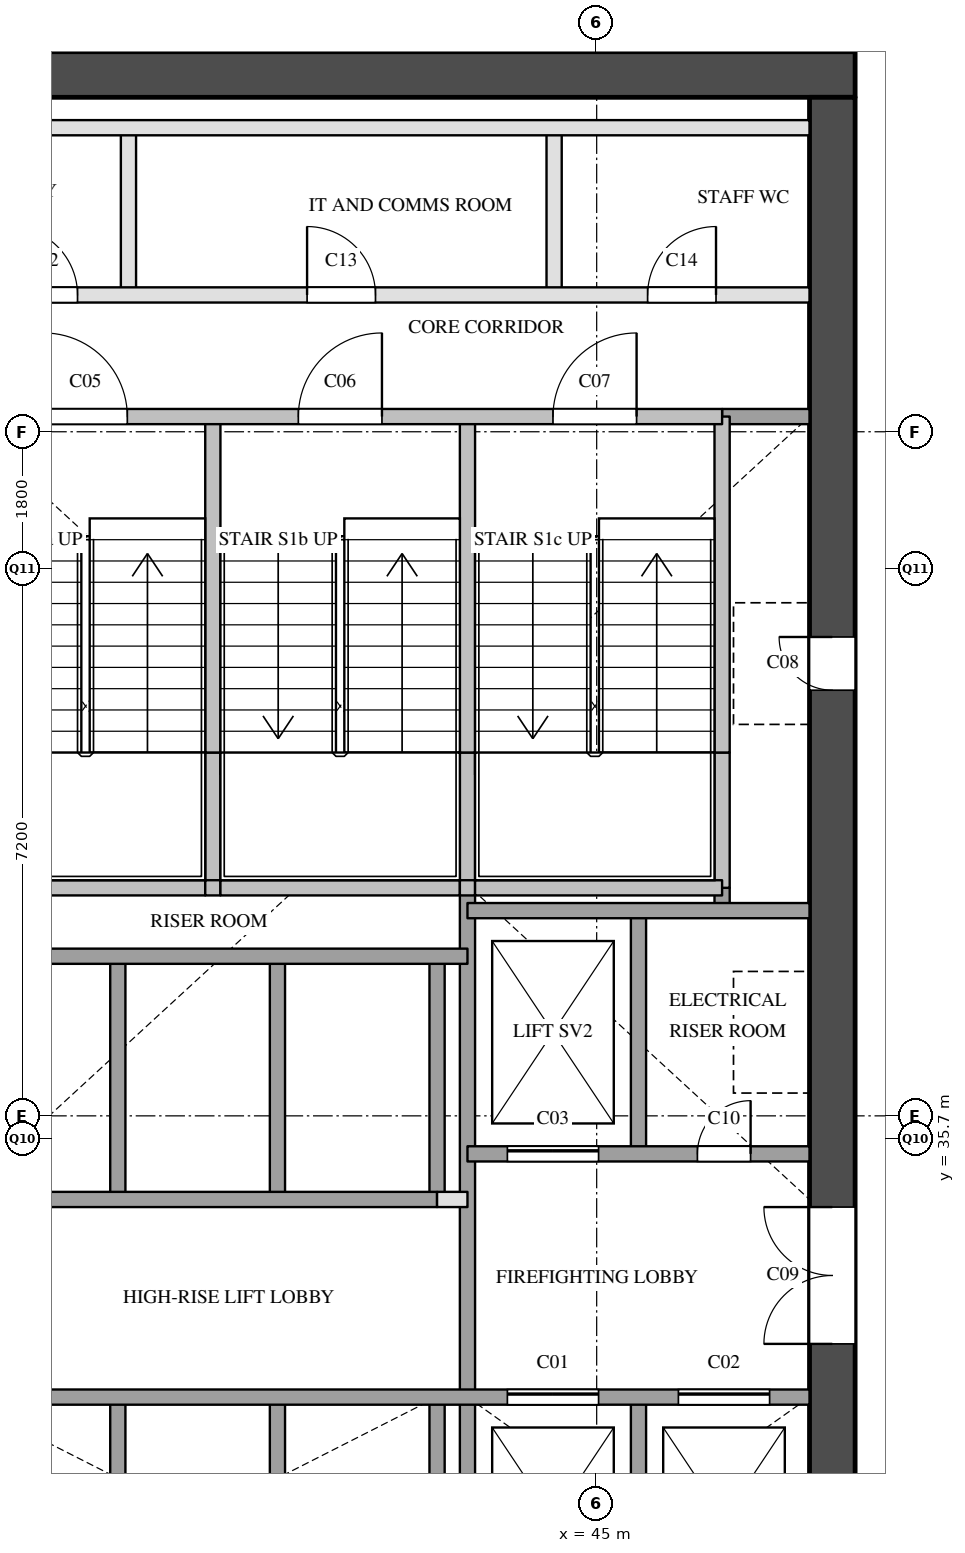
"""IFC4 building model, lengths in metres.
Left out: names, types, materials, properties, quantities, classifications, styles, units other than length and angle.
Written with IfcOpenShell. Run it as: python <this file> out.ifc"""

import sys

from ifc_helpers import new_model, si_unit, direction, frame, frame_2d, origin, place, context, subcontext, project, spatial, rectangle, extrude, element, fill, save


model = new_model("IFC4")
c1 = context("Model", 3, precision=1e-05, world=origin(), true_north=direction((0.0, 1.0)))
c2 = subcontext(c1, "Body", "Model", "MODEL_VIEW")
j1 = project(units=[si_unit("LENGTHUNIT", "METRE"), si_unit("PLANEANGLEUNIT", "RADIAN")], contexts=[c1])
p1 = place(None, origin())
s1 = spatial("IfcSite", under=j1, at=p1, CompositionType="ELEMENT")
p2 = place(p1, origin())
s2 = spatial("IfcBuilding", under=s1, at=p2, CompositionType="ELEMENT")
p3 = place(p2, frame((0.0, 0.0, 85.4)))
s3 = spatial("IfcBuildingStorey", under=s2, at=p3, CompositionType="ELEMENT", Elevation=85.4)
p4 = place(p3, frame((36.0, 49.7, 0.0), z_axis=(0.0, 0.0, 1.0), x_axis=(1.0, 0.0, 0.0)))
e1 = element("IfcWall", 1, at=p4, inside=s3, PredefinedType="SHEAR", context=c2, shape_type="SweptSolid", body=[
    extrude(rectangle(XDim=12.4, YDim=0.6, at=frame_2d((6.2, 0.0))), origin(), (0.0, 0.0, 1.0), 3.5),
])
p5 = place(p3, frame((48.1, 29.1, 0.0), z_axis=(0.0, 0.0, 1.0), x_axis=(0.0, 1.0, 0.0)))
e2 = element("IfcWall", 2, at=p5, inside=s3, PredefinedType="SHEAR", context=c2, shape_type="SweptSolid", body=[
    extrude(rectangle(XDim=20.3, YDim=0.6, at=frame_2d((10.15, 0.0))), origin(), (0.0, 0.0, 1.0), 3.5),
])
p6 = place(p5, frame((12.5, 0.0, 0.0)))
e3 = element("IfcOpeningElement", 3, at=p6, cuts=e2, PredefinedType="OPENING", context=c2, shape_type="SweptSolid", body=[
    extrude(rectangle(XDim=0.7, YDim=2.1, at=frame_2d((0.35, 1.05))), frame((0.0, 0.31, 0.0), z_axis=(0.0, -1.0, 0.0), x_axis=(1.0, 0.0, 0.0)), (0.0, 0.0, 1.0), 0.62),
])
p7 = place(p5, frame((3.9, 0.0, 0.0)))
e4 = element("IfcOpeningElement", 4, at=p7, cuts=e2, PredefinedType="OPENING", context=c2, shape_type="SweptSolid", body=[
    extrude(rectangle(XDim=1.8, YDim=2.1, at=frame_2d((0.9, 1.05))), frame((0.0, 0.31, 0.0), z_axis=(0.0, -1.0, 0.0), x_axis=(1.0, 0.0, 0.0)), (0.0, 0.0, 1.0), 0.62),
])
p8 = place(p3, frame((38.7, 29.1, 0.0), z_axis=(0.0, 0.0, 1.0), x_axis=(0.0, 1.0, 0.0)))
e5 = element("IfcWall", 5, at=p8, inside=s3, PredefinedType="SOLIDWALL", context=c2, shape_type="SweptSolid", body=[
    extrude(rectangle(XDim=3.2, YDim=0.2, at=frame_2d((1.6, 0.0))), origin(), (0.0, 0.0, 1.0), 3.5),
])
p9 = place(p3, frame((38.7, 34.9, 0.0), z_axis=(0.0, 0.0, 1.0), x_axis=(0.0, 1.0, 0.0)))
e6 = element("IfcWall", 6, at=p9, inside=s3, PredefinedType="SOLIDWALL", context=c2, shape_type="SweptSolid", body=[
    extrude(rectangle(XDim=3.2, YDim=0.2, at=frame_2d((1.6, 0.0))), origin(), (0.0, 0.0, 1.0), 3.5),
])
p10 = place(p3, frame((38.84, 46.8, 0.0), z_axis=(0.0, 0.0, 1.0), x_axis=(0.0, 1.0, 0.0)))
e7 = element("IfcWall", 7, at=p10, inside=s3, PredefinedType="PARTITIONING", context=c2, shape_type="SweptSolid", body=[
    extrude(rectangle(XDim=2.2, YDim=0.2, at=frame_2d((1.1, 0.0))), origin(), (0.0, 0.0, 1.0), 3.5),
])
p11 = place(p3, frame((39.95, 39.0, 0.0), z_axis=(0.0, 0.0, 1.0), x_axis=(0.0, 1.0, 0.0)))
e8 = element("IfcWall", 8, at=p11, inside=s3, PredefinedType="SOLIDWALL", context=c2, shape_type="SweptSolid", body=[
    extrude(rectangle(XDim=1.78, YDim=0.2, at=frame_2d((0.89, 0.0))), origin(), (0.0, 0.0, 1.0), 3.5),
])
p12 = place(p3, frame((39.95, 40.78, 0.0), z_axis=(0.0, 0.0, 1.0), x_axis=(0.0, 1.0, 0.0)))
e9 = element("IfcWall", 9, at=p12, inside=s3, PredefinedType="SOLIDWALL", context=c2, shape_type="SweptSolid", body=[
    extrude(rectangle(XDim=4.42, YDim=0.2, at=frame_2d((2.21, 0.0))), origin(), (0.0, 0.0, 1.0), 3.5),
])
p13 = place(p3, frame((40.8, 29.1, 0.0), z_axis=(0.0, 0.0, 1.0), x_axis=(0.0, 1.0, 0.0)))
e10 = element("IfcWall", 10, at=p13, inside=s3, PredefinedType="SOLIDWALL", context=c2, shape_type="SweptSolid", body=[
    extrude(rectangle(XDim=3.2, YDim=0.2, at=frame_2d((1.6, 0.0))), origin(), (0.0, 0.0, 1.0), 3.5),
])
p14 = place(p3, frame((40.8, 34.9, 0.0), z_axis=(0.0, 0.0, 1.0), x_axis=(0.0, 1.0, 0.0)))
e11 = element("IfcWall", 11, at=p14, inside=s3, PredefinedType="SOLIDWALL", context=c2, shape_type="SweptSolid", body=[
    extrude(rectangle(XDim=3.2, YDim=0.2, at=frame_2d((1.6, 0.0))), origin(), (0.0, 0.0, 1.0), 3.5),
])
p15 = place(p3, frame((42.9, 29.1, 0.0), z_axis=(0.0, 0.0, 1.0), x_axis=(0.0, 1.0, 0.0)))
e12 = element("IfcWall", 12, at=p15, inside=s3, PredefinedType="SOLIDWALL", context=c2, shape_type="SweptSolid", body=[
    extrude(rectangle(XDim=3.2, YDim=0.2, at=frame_2d((1.6, 0.0))), origin(), (0.0, 0.0, 1.0), 3.5),
])
p16 = place(p3, frame((42.9, 34.9, 0.0), z_axis=(0.0, 0.0, 1.0), x_axis=(0.0, 1.0, 0.0)))
e13 = element("IfcWall", 13, at=p16, inside=s3, PredefinedType="SOLIDWALL", context=c2, shape_type="SweptSolid", body=[
    extrude(rectangle(XDim=3.2, YDim=0.2, at=frame_2d((1.6, 0.0))), origin(), (0.0, 0.0, 1.0), 3.5),
])
p17 = place(p3, frame((43.3, 29.1, 0.0), z_axis=(0.0, 0.0, 1.0), x_axis=(0.0, 1.0, 0.0)))
e14 = element("IfcWall", 14, at=p17, inside=s3, PredefinedType="SOLIDWALL", context=c2, shape_type="SweptSolid", body=[
    extrude(rectangle(XDim=9.9, YDim=0.2, at=frame_2d((4.95, 0.0))), origin(), (0.0, 0.0, 1.0), 3.5),
])
p18 = place(p3, frame((43.3, 39.0, 0.0), z_axis=(0.0, 0.0, 1.0), x_axis=(0.0, 1.0, 0.0)))
e15 = element("IfcWall", 15, at=p18, inside=s3, PredefinedType="SOLIDWALL", context=c2, shape_type="SweptSolid", body=[
    extrude(rectangle(XDim=1.78, YDim=0.2, at=frame_2d((0.89, 0.0))), origin(), (0.0, 0.0, 1.0), 3.5),
])
p19 = place(p3, frame((43.3, 40.78, 0.0), z_axis=(0.0, 0.0, 1.0), x_axis=(0.0, 1.0, 0.0)))
e16 = element("IfcWall", 16, at=p19, inside=s3, PredefinedType="SOLIDWALL", context=c2, shape_type="SweptSolid", body=[
    extrude(rectangle(XDim=4.42, YDim=0.2, at=frame_2d((2.21, 0.0))), origin(), (0.0, 0.0, 1.0), 3.5),
])
p20 = place(p3, frame((44.44, 46.8, 0.0), z_axis=(0.0, 0.0, 1.0), x_axis=(0.0, 1.0, 0.0)))
e17 = element("IfcWall", 17, at=p20, inside=s3, PredefinedType="PARTITIONING", context=c2, shape_type="SweptSolid", body=[
    extrude(rectangle(XDim=2.2, YDim=0.2, at=frame_2d((1.1, 0.0))), origin(), (0.0, 0.0, 1.0), 3.5),
])
for number, where, z_axis, x_axis in (
    (18, (45.55, 29.1, 0.0), (0.0, 0.0, 1.0), (0.0, 1.0, 0.0)),
    (19, (45.55, 35.5, 0.0), (0.0, 0.0, 1.0), (0.0, 1.0, 0.0)),
):
    element("IfcWall", number, at=place(p3, frame(where, z_axis=z_axis, x_axis=x_axis)), inside=s3, PredefinedType="SOLIDWALL", context=c2, shape_type="SweptSolid", body=[
        extrude(rectangle(XDim=3.2, YDim=0.2, at=frame_2d((1.6, 0.0))), origin(), (0.0, 0.0, 1.0), 3.5),
    ])
p21 = place(p3, frame((46.65, 38.7, 0.0), z_axis=(0.0, 0.0, 1.0), x_axis=(0.0, 1.0, 0.0)))
e20 = element("IfcWall", 20, at=p21, inside=s3, PredefinedType="SOLIDWALL", context=c2, shape_type="SweptSolid", body=[
    extrude(rectangle(XDim=0.3, YDim=0.2, at=frame_2d((0.15, 0.0))), origin(), (0.0, 0.0, 1.0), 3.5),
])
p22 = place(p3, frame((46.65, 39.0, 0.0), z_axis=(0.0, 0.0, 1.0), x_axis=(0.0, 1.0, 0.0)))
e21 = element("IfcWall", 21, at=p22, inside=s3, PredefinedType="SOLIDWALL", context=c2, shape_type="SweptSolid", body=[
    extrude(rectangle(XDim=1.78, YDim=0.2, at=frame_2d((0.89, 0.0))), origin(), (0.0, 0.0, 1.0), 3.5),
])
p23 = place(p3, frame((46.65, 40.78, 0.0), z_axis=(0.0, 0.0, 1.0), x_axis=(0.0, 1.0, 0.0)))
e22 = element("IfcWall", 22, at=p23, inside=s3, PredefinedType="SOLIDWALL", context=c2, shape_type="SweptSolid", body=[
    extrude(rectangle(XDim=4.42, YDim=0.2, at=frame_2d((2.21, 0.0))), origin(), (0.0, 0.0, 1.0), 3.5),
])
p24 = place(p3, frame((36.6, 32.3, 0.0), z_axis=(0.0, 0.0, 1.0), x_axis=(1.0, 0.0, 0.0)))
e23 = element("IfcWall", 23, at=p24, inside=s3, PredefinedType="SOLIDWALL", context=c2, shape_type="SweptSolid", body=[
    extrude(rectangle(XDim=11.2, YDim=0.2, at=frame_2d((5.6, 0.0))), origin(), (0.0, 0.0, 1.0), 3.5),
])
p25 = place(p24, frame((7.225, 0.0, 0.0)))
e24 = element("IfcOpeningElement", 24, at=p25, cuts=e23, PredefinedType="OPENING", context=c2, shape_type="SweptSolid", body=[
    extrude(rectangle(XDim=1.2, YDim=2.1, at=frame_2d((0.6, 1.05))), frame((0.0, 0.11, 0.0), z_axis=(0.0, -1.0, 0.0), x_axis=(1.0, 0.0, 0.0)), (0.0, 0.0, 1.0), 0.22),
])
p26 = place(p24, frame((9.475, 0.0, 0.0)))
e25 = element("IfcOpeningElement", 25, at=p26, cuts=e23, PredefinedType="OPENING", context=c2, shape_type="SweptSolid", body=[
    extrude(rectangle(XDim=1.2, YDim=2.1, at=frame_2d((0.6, 1.05))), frame((0.0, 0.11, 0.0), z_axis=(0.0, -1.0, 0.0), x_axis=(1.0, 0.0, 0.0)), (0.0, 0.0, 1.0), 0.22),
])
p27 = place(p3, frame((42.9, 34.9, 0.0), z_axis=(0.0, 0.0, 1.0), x_axis=(1.0, 0.0, 0.0)))
e26 = element("IfcWall", 26, at=p27, inside=s3, PredefinedType="PARTITIONING", context=c2, shape_type="SweptSolid", body=[
    extrude(rectangle(XDim=0.4, YDim=0.2, at=frame_2d((0.2, 0.0))), origin(), (0.0, 0.0, 1.0), 3.5),
])
p28 = place(p3, frame((36.6, 34.9, 0.0), z_axis=(0.0, 0.0, 1.0), x_axis=(1.0, 0.0, 0.0)))
e27 = element("IfcWall", 27, at=p28, inside=s3, PredefinedType="SOLIDWALL", context=c2, shape_type="SweptSolid", body=[
    extrude(rectangle(XDim=6.3, YDim=0.2, at=frame_2d((3.15, 0.0))), origin(), (0.0, 0.0, 1.0), 3.5),
])
p29 = place(p3, frame((43.3, 35.5, 0.0), z_axis=(0.0, 0.0, 1.0), x_axis=(1.0, 0.0, 0.0)))
e28 = element("IfcWall", 28, at=p29, inside=s3, PredefinedType="SOLIDWALL", context=c2, shape_type="SweptSolid", body=[
    extrude(rectangle(XDim=4.5, YDim=0.2, at=frame_2d((2.25, 0.0))), origin(), (0.0, 0.0, 1.0), 3.5),
])
p30 = place(p29, frame((0.525, 0.0, 0.0)))
e29 = element("IfcOpeningElement", 29, at=p30, cuts=e28, PredefinedType="OPENING", context=c2, shape_type="SweptSolid", body=[
    extrude(rectangle(XDim=1.2, YDim=2.1, at=frame_2d((0.6, 1.05))), frame((0.0, 0.11, 0.0), z_axis=(0.0, -1.0, 0.0), x_axis=(1.0, 0.0, 0.0)), (0.0, 0.0, 1.0), 0.22),
])
p31 = place(p29, frame((3.025, 0.0, 0.0)))
e30 = element("IfcOpeningElement", 30, at=p31, cuts=e28, PredefinedType="OPENING", context=c2, shape_type="SweptSolid", body=[
    extrude(rectangle(XDim=0.7, YDim=2.1, at=frame_2d((0.35, 1.05))), frame((0.0, 0.11, 0.0), z_axis=(0.0, -1.0, 0.0), x_axis=(1.0, 0.0, 0.0)), (0.0, 0.0, 1.0), 0.22),
])
p32 = place(p3, frame((36.6, 38.1, 0.0), z_axis=(0.0, 0.0, 1.0), x_axis=(1.0, 0.0, 0.0)))
e31 = element("IfcWall", 31, at=p32, inside=s3, PredefinedType="SOLIDWALL", context=c2, shape_type="SweptSolid", body=[
    extrude(rectangle(XDim=6.7, YDim=0.2, at=frame_2d((3.35, 0.0))), origin(), (0.0, 0.0, 1.0), 3.5),
])
p33 = place(p3, frame((43.3, 38.7, 0.0), z_axis=(0.0, 0.0, 1.0), x_axis=(1.0, 0.0, 0.0)))
e32 = element("IfcWall", 32, at=p33, inside=s3, PredefinedType="SOLIDWALL", context=c2, shape_type="SweptSolid", body=[
    extrude(rectangle(XDim=4.5, YDim=0.2, at=frame_2d((2.25, 0.0))), origin(), (0.0, 0.0, 1.0), 3.5),
])
p34 = place(p3, frame((36.6, 39.0, 0.0), z_axis=(0.0, 0.0, 1.0), x_axis=(1.0, 0.0, 0.0)))
e33 = element("IfcWall", 33, at=p34, inside=s3, PredefinedType="SOLIDWALL", context=c2, shape_type="SweptSolid", body=[
    extrude(rectangle(XDim=3.25, YDim=0.2, at=frame_2d((1.625, 0.0))), origin(), (0.0, 0.0, 1.0), 3.5),
])
p35 = place(p3, frame((39.85, 39.0, 0.0), z_axis=(0.0, 0.0, 1.0), x_axis=(1.0, 0.0, 0.0)))
e34 = element("IfcWall", 34, at=p35, inside=s3, PredefinedType="SOLIDWALL", context=c2, shape_type="SweptSolid", body=[
    extrude(rectangle(XDim=0.2, YDim=0.2, at=frame_2d((0.1, 0.0))), origin(), (0.0, 0.0, 1.0), 3.5),
])
p36 = place(p3, frame((40.05, 39.0, 0.0), z_axis=(0.0, 0.0, 1.0), x_axis=(1.0, 0.0, 0.0)))
e35 = element("IfcWall", 35, at=p36, inside=s3, PredefinedType="SOLIDWALL", context=c2, shape_type="SweptSolid", body=[
    extrude(rectangle(XDim=3.15, YDim=0.2, at=frame_2d((1.575, 0.0))), origin(), (0.0, 0.0, 1.0), 3.5),
])
p37 = place(p3, frame((43.2, 39.0, 0.0), z_axis=(0.0, 0.0, 1.0), x_axis=(1.0, 0.0, 0.0)))
e36 = element("IfcWall", 36, at=p37, inside=s3, PredefinedType="SOLIDWALL", context=c2, shape_type="SweptSolid", body=[
    extrude(rectangle(XDim=0.2, YDim=0.2, at=frame_2d((0.1, 0.0))), origin(), (0.0, 0.0, 1.0), 3.5),
])
p38 = place(p3, frame((43.4, 39.0, 0.0), z_axis=(0.0, 0.0, 1.0), x_axis=(1.0, 0.0, 0.0)))
e37 = element("IfcWall", 37, at=p38, inside=s3, PredefinedType="SOLIDWALL", context=c2, shape_type="SweptSolid", body=[
    extrude(rectangle(XDim=3.25, YDim=0.2, at=frame_2d((1.625, 0.0))), origin(), (0.0, 0.0, 1.0), 3.5),
])
p39 = place(p3, frame((46.65, 45.2, 0.0), z_axis=(0.0, 0.0, 1.0), x_axis=(1.0, 0.0, 0.0)))
e38 = element("IfcWall", 38, at=p39, inside=s3, PredefinedType="SOLIDWALL", context=c2, shape_type="SweptSolid", body=[
    extrude(rectangle(XDim=1.15, YDim=0.2, at=frame_2d((0.575, 0.0))), origin(), (0.0, 0.0, 1.0), 3.5),
])
p40 = place(p3, frame((36.6, 45.2, 0.0), z_axis=(0.0, 0.0, 1.0), x_axis=(1.0, 0.0, 0.0)))
e39 = element("IfcWall", 39, at=p40, inside=s3, PredefinedType="SOLIDWALL", context=c2, shape_type="SweptSolid", body=[
    extrude(rectangle(XDim=10.05, YDim=0.2, at=frame_2d((5.025, 0.0))), origin(), (0.0, 0.0, 1.0), 3.5),
])
p41 = place(p40, frame((1.125, 0.0, 0.0)))
e40 = element("IfcOpeningElement", 40, at=p41, cuts=e39, PredefinedType="OPENING", context=c2, shape_type="SweptSolid", body=[
    extrude(rectangle(XDim=1.1, YDim=2.1, at=frame_2d((0.55, 1.05))), frame((0.0, 0.11, 0.0), z_axis=(0.0, -1.0, 0.0), x_axis=(1.0, 0.0, 0.0)), (0.0, 0.0, 1.0), 0.22),
])
p42 = place(p40, frame((4.475, 0.0, 0.0)))
e41 = element("IfcOpeningElement", 41, at=p42, cuts=e39, PredefinedType="OPENING", context=c2, shape_type="SweptSolid", body=[
    extrude(rectangle(XDim=1.1, YDim=2.1, at=frame_2d((0.55, 1.05))), frame((0.0, 0.11, 0.0), z_axis=(0.0, -1.0, 0.0), x_axis=(1.0, 0.0, 0.0)), (0.0, 0.0, 1.0), 0.22),
])
p43 = place(p40, frame((7.825, 0.0, 0.0)))
e42 = element("IfcOpeningElement", 42, at=p43, cuts=e39, PredefinedType="OPENING", context=c2, shape_type="SweptSolid", body=[
    extrude(rectangle(XDim=1.1, YDim=2.1, at=frame_2d((0.55, 1.05))), frame((0.0, 0.11, 0.0), z_axis=(0.0, -1.0, 0.0), x_axis=(1.0, 0.0, 0.0)), (0.0, 0.0, 1.0), 0.22),
])
p44 = place(p3, frame((36.6, 46.8, 0.0), z_axis=(0.0, 0.0, 1.0), x_axis=(1.0, 0.0, 0.0)))
e43 = element("IfcWall", 43, at=p44, inside=s3, PredefinedType="PARTITIONING", context=c2, shape_type="SweptSolid", body=[
    extrude(rectangle(XDim=11.2, YDim=0.2, at=frame_2d((5.6, 0.0))), origin(), (0.0, 0.0, 1.0), 3.5),
])
p45 = place(p44, frame((0.67, 0.0, 0.0)))
e44 = element("IfcOpeningElement", 44, at=p45, cuts=e43, PredefinedType="OPENING", context=c2, shape_type="SweptSolid", body=[
    extrude(rectangle(XDim=0.9, YDim=2.1, at=frame_2d((0.45, 1.05))), frame((0.0, 0.11, 0.0), z_axis=(0.0, -1.0, 0.0), x_axis=(1.0, 0.0, 0.0)), (0.0, 0.0, 1.0), 0.22),
])
p46 = place(p44, frame((4.59, 0.0, 0.0)))
e45 = element("IfcOpeningElement", 45, at=p46, cuts=e43, PredefinedType="OPENING", context=c2, shape_type="SweptSolid", body=[
    extrude(rectangle(XDim=0.9, YDim=2.1, at=frame_2d((0.45, 1.05))), frame((0.0, 0.11, 0.0), z_axis=(0.0, -1.0, 0.0), x_axis=(1.0, 0.0, 0.0)), (0.0, 0.0, 1.0), 0.22),
])
p47 = place(p44, frame((9.07, 0.0, 0.0)))
e46 = element("IfcOpeningElement", 46, at=p47, cuts=e43, PredefinedType="OPENING", context=c2, shape_type="SweptSolid", body=[
    extrude(rectangle(XDim=0.9, YDim=2.1, at=frame_2d((0.45, 1.05))), frame((0.0, 0.11, 0.0), z_axis=(0.0, -1.0, 0.0), x_axis=(1.0, 0.0, 0.0)), (0.0, 0.0, 1.0), 0.22),
])
p48 = place(p3, frame((36.6, 49.0, 0.0), z_axis=(0.0, 0.0, 1.0), x_axis=(1.0, 0.0, 0.0)))
e47 = element("IfcWall", 47, at=p48, inside=s3, PredefinedType="PARTITIONING", context=c2, shape_type="SweptSolid", body=[
    extrude(rectangle(XDim=11.2, YDim=0.2, at=frame_2d((5.6, 0.0))), origin(), (0.0, 0.0, 1.0), 3.5),
])
p49 = place(p25, origin())
e48 = element("IfcDoor", 48, at=p49, inside=s3, OperationType="SLIDING_TO_LEFT", PredefinedType="DOOR", context=c2, shape_type="SweptSolid", body=[
    extrude(rectangle(XDim=1.2, YDim=2.1, at=frame_2d((0.6, 1.05))), frame((0.0, 0.025, 0.0), z_axis=(0.0, -1.0, 0.0), x_axis=(1.0, 0.0, 0.0)), (0.0, 0.0, 1.0), 0.05),
])
fill(e24, e48)
p50 = place(p26, origin())
e49 = element("IfcDoor", 49, at=p50, inside=s3, OperationType="SLIDING_TO_LEFT", PredefinedType="DOOR", context=c2, shape_type="SweptSolid", body=[
    extrude(rectangle(XDim=1.2, YDim=2.1, at=frame_2d((0.6, 1.05))), frame((0.0, 0.025, 0.0), z_axis=(0.0, -1.0, 0.0), x_axis=(1.0, 0.0, 0.0)), (0.0, 0.0, 1.0), 0.05),
])
fill(e25, e49)
p51 = place(p30, origin())
e50 = element("IfcDoor", 50, at=p51, inside=s3, OperationType="SLIDING_TO_LEFT", PredefinedType="DOOR", context=c2, shape_type="SweptSolid", body=[
    extrude(rectangle(XDim=1.2, YDim=2.1, at=frame_2d((0.6, 1.05))), frame((0.0, 0.025, 0.0), z_axis=(0.0, -1.0, 0.0), x_axis=(1.0, 0.0, 0.0)), (0.0, 0.0, 1.0), 0.05),
])
fill(e29, e50)
p52 = place(p41, origin())
e51 = element("IfcDoor", 51, at=p52, inside=s3, OperationType="SINGLE_SWING_LEFT", PredefinedType="DOOR", context=c2, shape_type="SweptSolid", body=[
    extrude(rectangle(XDim=1.1, YDim=2.1, at=frame_2d((0.55, 1.05))), frame((0.0, 0.025, 0.0), z_axis=(0.0, -1.0, 0.0), x_axis=(1.0, 0.0, 0.0)), (0.0, 0.0, 1.0), 0.05),
])
fill(e40, e51)
p53 = place(p42, origin())
e52 = element("IfcDoor", 52, at=p53, inside=s3, OperationType="SINGLE_SWING_RIGHT", PredefinedType="DOOR", context=c2, shape_type="SweptSolid", body=[
    extrude(rectangle(XDim=1.1, YDim=2.1, at=frame_2d((0.55, 1.05))), frame((0.0, 0.025, 0.0), z_axis=(0.0, -1.0, 0.0), x_axis=(1.0, 0.0, 0.0)), (0.0, 0.0, 1.0), 0.05),
])
fill(e41, e52)
p54 = place(p43, origin())
e53 = element("IfcDoor", 53, at=p54, inside=s3, OperationType="SINGLE_SWING_RIGHT", PredefinedType="DOOR", context=c2, shape_type="SweptSolid", body=[
    extrude(rectangle(XDim=1.1, YDim=2.1, at=frame_2d((0.55, 1.05))), frame((0.0, 0.025, 0.0), z_axis=(0.0, -1.0, 0.0), x_axis=(1.0, 0.0, 0.0)), (0.0, 0.0, 1.0), 0.05),
])
fill(e42, e53)
p55 = place(p6, origin())
e54 = element("IfcDoor", 54, at=p55, inside=s3, OperationType="SINGLE_SWING_RIGHT", PredefinedType="DOOR", context=c2, shape_type="SweptSolid", body=[
    extrude(rectangle(XDim=0.7, YDim=2.1, at=frame_2d((0.35, 1.05))), frame((0.0, 0.025, 0.0), z_axis=(0.0, -1.0, 0.0), x_axis=(1.0, 0.0, 0.0)), (0.0, 0.0, 1.0), 0.05),
])
fill(e3, e54)
p56 = place(p7, origin())
e55 = element("IfcDoor", 55, at=p56, inside=s3, OperationType="DOUBLE_DOOR_SINGLE_SWING", PredefinedType="DOOR", context=c2, shape_type="SweptSolid", body=[
    extrude(rectangle(XDim=1.8, YDim=2.1, at=frame_2d((0.9, 1.05))), frame((0.0, 0.025, 0.0), z_axis=(0.0, -1.0, 0.0), x_axis=(1.0, 0.0, 0.0)), (0.0, 0.0, 1.0), 0.05),
])
fill(e4, e55)
p57 = place(p31, origin())
e56 = element("IfcDoor", 56, at=p57, inside=s3, OperationType="SINGLE_SWING_RIGHT", PredefinedType="DOOR", context=c2, shape_type="SweptSolid", body=[
    extrude(rectangle(XDim=0.7, YDim=2.1, at=frame_2d((0.35, 1.05))), frame((0.0, 0.025, 0.0), z_axis=(0.0, -1.0, 0.0), x_axis=(1.0, 0.0, 0.0)), (0.0, 0.0, 1.0), 0.05),
])
fill(e30, e56)
p58 = place(p45, origin())
e57 = element("IfcDoor", 57, at=p58, inside=s3, OperationType="SINGLE_SWING_LEFT", PredefinedType="DOOR", context=c2, shape_type="SweptSolid", body=[
    extrude(rectangle(XDim=0.9, YDim=2.1, at=frame_2d((0.45, 1.05))), frame((0.0, 0.025, 0.0), z_axis=(0.0, -1.0, 0.0), x_axis=(1.0, 0.0, 0.0)), (0.0, 0.0, 1.0), 0.05),
])
fill(e44, e57)
p59 = place(p46, origin())
e58 = element("IfcDoor", 58, at=p59, inside=s3, OperationType="SINGLE_SWING_LEFT", PredefinedType="DOOR", context=c2, shape_type="SweptSolid", body=[
    extrude(rectangle(XDim=0.9, YDim=2.1, at=frame_2d((0.45, 1.05))), frame((0.0, 0.025, 0.0), z_axis=(0.0, -1.0, 0.0), x_axis=(1.0, 0.0, 0.0)), (0.0, 0.0, 1.0), 0.05),
])
fill(e45, e58)
p60 = place(p47, origin())
e59 = element("IfcDoor", 59, at=p60, inside=s3, OperationType="SINGLE_SWING_RIGHT", PredefinedType="DOOR", context=c2, shape_type="SweptSolid", body=[
    extrude(rectangle(XDim=0.9, YDim=2.1, at=frame_2d((0.45, 1.05))), frame((0.0, 0.025, 0.0), z_axis=(0.0, -1.0, 0.0), x_axis=(1.0, 0.0, 0.0)), (0.0, 0.0, 1.0), 0.05),
])
fill(e46, e59)
save(model, sys.argv[1])
